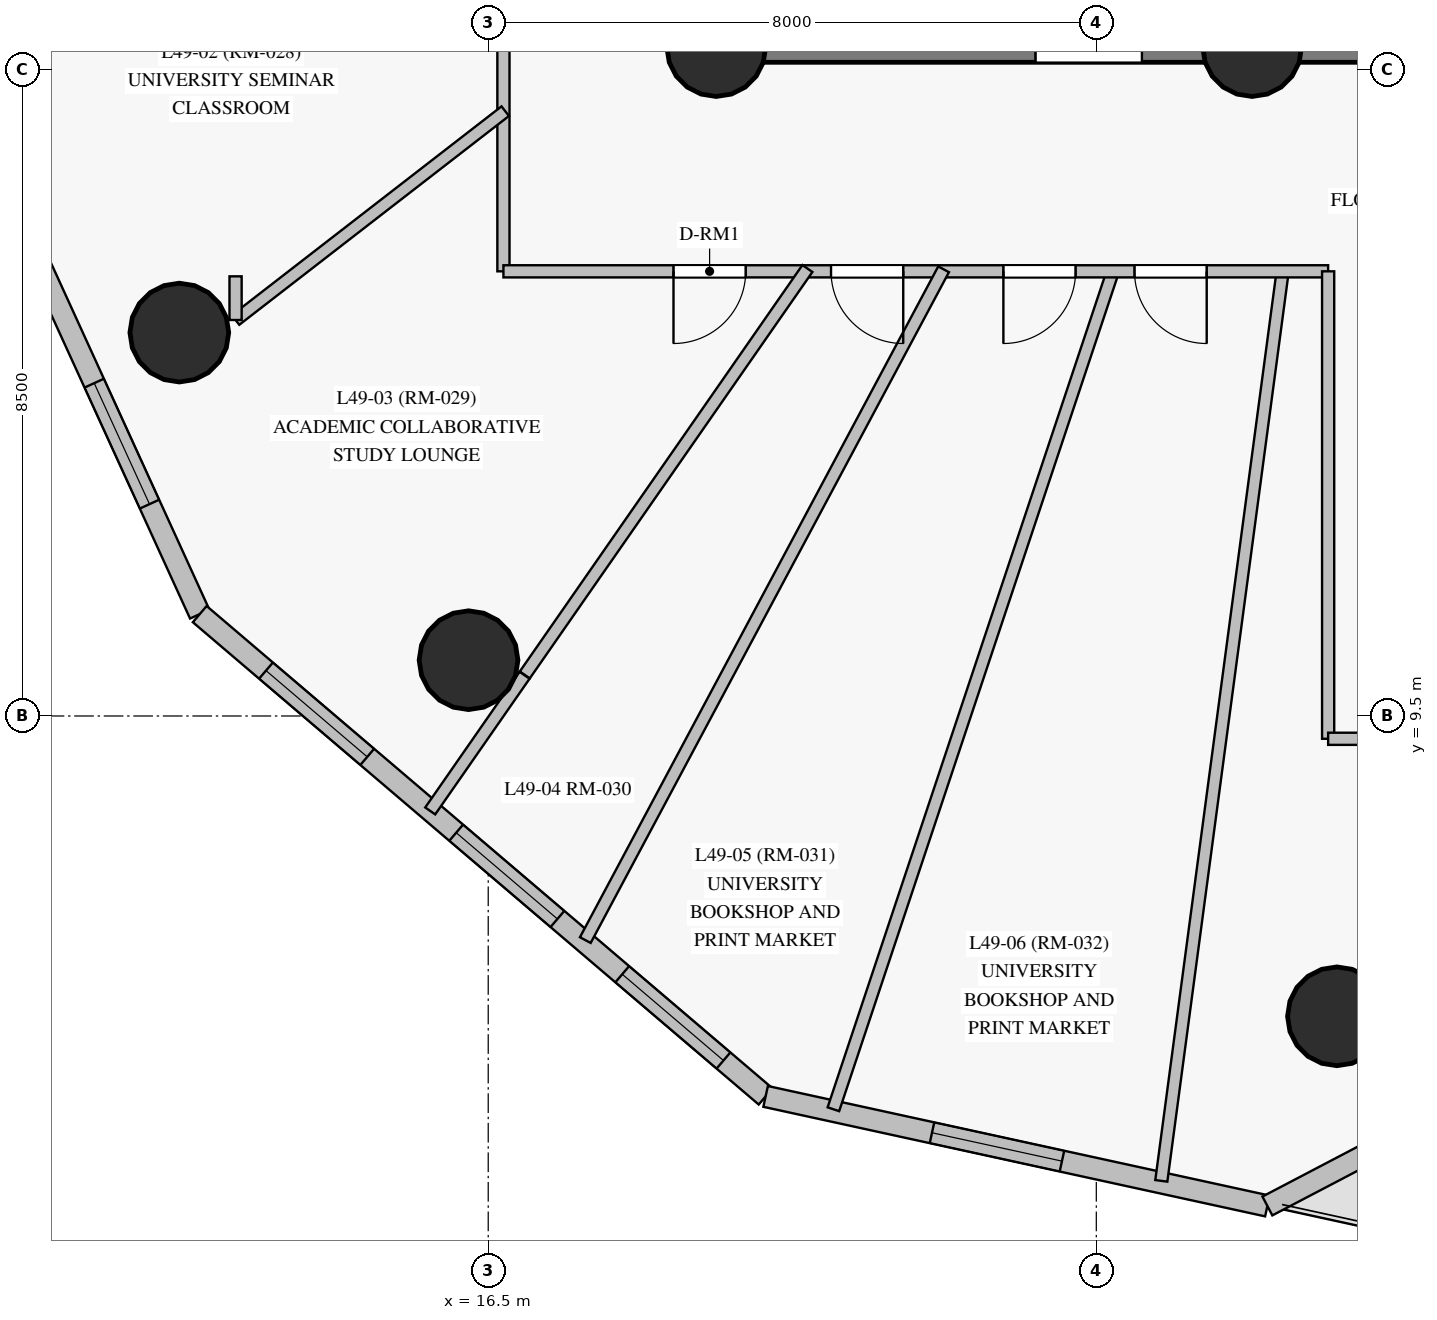
"""IFC4 building model, lengths in metres.
Left out: names, types, materials, properties, quantities, classifications, styles, units other than length and angle.
Written with IfcOpenShell. Run it as: python <this file> out.ifc"""

import sys

from ifc_helpers import new_model, si_unit, direction, frame, frame_2d, origin, origin_with_axes, origin_2d, place, context, subcontext, project, spatial, rectangle, circle, extrude, source, transform, mapped, element, fill, save


model = new_model("IFC4")
c1 = context("Model", 3, precision=1e-05, world=origin(), true_north=direction((0.0, 1.0)))
c2 = subcontext(c1, "Body", "Model", "MODEL_VIEW")
j1 = project(units=[si_unit("LENGTHUNIT", "METRE"), si_unit("PLANEANGLEUNIT", "RADIAN")], contexts=[c1])
p1 = place(None, origin())
s1 = spatial("IfcSite", under=j1, at=p1, CompositionType="ELEMENT")
p2 = place(p1, origin())
s2 = spatial("IfcBuilding", under=s1, at=p2, CompositionType="ELEMENT")
p3 = place(p2, frame((0.0, 0.0, 171.8)))
s3 = spatial("IfcBuildingStorey", under=s2, at=p3, CompositionType="ELEMENT", Elevation=171.8)
p4 = place(p3, frame((19.5, 18.3, 0.0), z_axis=(0.0, 0.0, 1.0), x_axis=(1.0, 0.0, 0.0)))
e1 = element("IfcWall", 1, at=p4, inside=s3, PredefinedType="SHEAR", context=c2, shape_type="SweptSolid", body=[
    extrude(rectangle(XDim=7.05, YDim=0.4, at=frame_2d((3.525, 0.0))), origin(), (0.0, 0.0, 1.0), 2.825),
])
p5 = place(p4, frame((4.2, 0.0, 0.0)))
e2 = element("IfcOpeningElement", 2, at=p5, cuts=e1, PredefinedType="OPENING", context=c2, shape_type="SweptSolid", body=[
    extrude(rectangle(XDim=1.4, YDim=2.2, at=frame_2d((0.7, 1.1))), frame((0.0, 0.21, 0.0), z_axis=(0.0, -1.0, 0.0), x_axis=(1.0, 0.0, 0.0)), (0.0, 0.0, 1.0), 0.42),
])
p6 = place(p3, frame((26.55, 18.3, 0.0), z_axis=(0.0, 0.0, 1.0), x_axis=(1.0, 0.0, 0.0)))
e3 = element("IfcWall", 3, at=p6, inside=s3, PredefinedType="SHEAR", context=c2, shape_type="SweptSolid", body=[
    extrude(rectangle(XDim=10.95, YDim=0.4, at=frame_2d((5.475, 0.0))), origin(), (0.0, 0.0, 1.0), 2.825),
])
p7 = place(p6, frame((4.55, 0.0, 0.0)))
e4 = element("IfcOpeningElement", 4, at=p7, cuts=e3, PredefinedType="OPENING", context=c2, shape_type="SweptSolid", body=[
    extrude(rectangle(XDim=1.4, YDim=2.2, at=frame_2d((0.7, 1.1))), frame((0.0, 0.21, 0.0), z_axis=(0.0, -1.0, 0.0), x_axis=(1.0, 0.0, 0.0)), (0.0, 0.0, 1.0), 0.42),
])
m1 = source(origin_with_axes(), c2, "Body", "SweptSolid", [
    extrude(circle(Radius=0.65, at=origin_2d()), origin(), (0.0, 0.0, 1.0), 3.05),
])
for number, where, z_axis, x_axis in (
    (5, (19.5, 18.3, 0.0), (0.0, 0.0, 1.0), (1.0, 0.0, 0.0)),
    (6, (26.55, 18.3, 0.0), (0.0, 0.0, 1.0), (1.0, 0.0, 0.0)),
    (7, (12.436, 14.544, 0.0), (0.0, 0.0, 1.0), (1.0, 0.0, 0.0)),
    (8, (16.241, 10.234, 0.0), (0.0, 0.0, 1.0), (1.0, 0.0, 0.0)),
    (9, (27.666, 5.549, 0.0), (0.0, 0.0, 1.0), (1.0, 0.0, 0.0)),
):
    element("IfcColumn", number, at=place(p3, frame(where, z_axis=z_axis, x_axis=x_axis)), inside=s3, PredefinedType="COLUMN", context=c2, shape_type="MappedRepresentation", body=[
        mapped(m1, transform((0.0, 0.0, 0.0), scale=1.0)),
    ])
p8 = place(p3, frame((6.958, 23.418, 0.0), z_axis=(0.0, 0.0, 1.0), x_axis=(0.415561981729, -0.909564862636, 0.0)))
e10 = element("IfcWall", 10, at=p8, inside=s3, PredefinedType="SOLIDWALL", context=c2, shape_type="SweptSolid", body=[
    extrude(rectangle(XDim=13.828, YDim=0.28, at=frame_2d((6.914, 0.0))), origin(), (0.0, 0.0, 1.0), 2.825),
])
p9 = place(p8, frame((1.548, 0.0, 0.85)))
e11 = element("IfcOpeningElement", 11, at=p9, cuts=e10, PredefinedType="OPENING", context=c2, shape_type="SweptSolid", body=[
    extrude(rectangle(XDim=1.75, YDim=1.65, at=frame_2d((0.875, 0.825))), frame((0.0, 0.15, 0.0), z_axis=(0.0, -1.0, 0.0), x_axis=(1.0, 0.0, 0.0)), (0.0, 0.0, 1.0), 0.3),
])
p10 = place(p8, frame((6.317, 0.0, 0.85)))
e12 = element("IfcOpeningElement", 12, at=p10, cuts=e10, PredefinedType="OPENING", context=c2, shape_type="SweptSolid", body=[
    extrude(rectangle(XDim=1.75, YDim=1.65, at=frame_2d((0.875, 0.825))), frame((0.0, 0.15, 0.0), z_axis=(0.0, -1.0, 0.0), x_axis=(1.0, 0.0, 0.0)), (0.0, 0.0, 1.0), 0.3),
])
p11 = place(p8, frame((10.488, 0.0, 0.85)))
e13 = element("IfcOpeningElement", 13, at=p11, cuts=e10, PredefinedType="OPENING", context=c2, shape_type="SweptSolid", body=[
    extrude(rectangle(XDim=1.75, YDim=1.65, at=frame_2d((0.875, 0.825))), frame((0.0, 0.15, 0.0), z_axis=(0.0, -1.0, 0.0), x_axis=(1.0, 0.0, 0.0)), (0.0, 0.0, 1.0), 0.3),
])
p12 = place(p3, frame((12.705, 10.84, 0.0), z_axis=(0.0, 0.0, 1.0), x_axis=(0.761087604187, -0.648649102946, 0.0)))
e14 = element("IfcWall", 14, at=p12, inside=s3, PredefinedType="SOLIDWALL", context=c2, shape_type="SweptSolid", body=[
    extrude(rectangle(XDim=9.782, YDim=0.28, at=frame_2d((4.891, 0.0))), origin(), (0.0, 0.0, 1.0), 2.825),
])
p13 = place(p12, frame((1.146, 0.0, 0.85)))
e15 = element("IfcOpeningElement", 15, at=p13, cuts=e14, PredefinedType="OPENING", context=c2, shape_type="SweptSolid", body=[
    extrude(rectangle(XDim=1.75, YDim=1.65, at=frame_2d((0.875, 0.825))), frame((0.0, 0.15, 0.0), z_axis=(0.0, -1.0, 0.0), x_axis=(1.0, 0.0, 0.0)), (0.0, 0.0, 1.0), 0.3),
])
p14 = place(p12, frame((4.433, 0.0, 0.85)))
e16 = element("IfcOpeningElement", 16, at=p14, cuts=e14, PredefinedType="OPENING", context=c2, shape_type="SweptSolid", body=[
    extrude(rectangle(XDim=1.75, YDim=1.65, at=frame_2d((0.875, 0.825))), frame((0.0, 0.15, 0.0), z_axis=(0.0, -1.0, 0.0), x_axis=(1.0, 0.0, 0.0)), (0.0, 0.0, 1.0), 0.3),
])
p15 = place(p12, frame((7.303, 0.0, 0.85)))
e17 = element("IfcOpeningElement", 17, at=p15, cuts=e14, PredefinedType="OPENING", context=c2, shape_type="SweptSolid", body=[
    extrude(rectangle(XDim=1.75, YDim=1.65, at=frame_2d((0.875, 0.825))), frame((0.0, 0.15, 0.0), z_axis=(0.0, -1.0, 0.0), x_axis=(1.0, 0.0, 0.0)), (0.0, 0.0, 1.0), 0.3),
])
p16 = place(p3, frame((20.149, 4.495, 0.0), z_axis=(0.0, 0.0, 1.0), x_axis=(0.97698126959, -0.21332510136, 0.0)))
e18 = element("IfcWall", 18, at=p16, inside=s3, PredefinedType="SOLIDWALL", context=c2, shape_type="SweptSolid", body=[
    extrude(rectangle(XDim=6.757, YDim=0.28, at=frame_2d((3.378, 0.0))), origin(), (0.0, 0.0, 1.0), 2.825),
])
p17 = place(p16, frame((2.24, 0.0, 0.85)))
e19 = element("IfcOpeningElement", 19, at=p17, cuts=e18, PredefinedType="OPENING", context=c2, shape_type="SweptSolid", body=[
    extrude(rectangle(XDim=1.75, YDim=1.65, at=frame_2d((0.875, 0.825))), frame((0.0, 0.15, 0.0), z_axis=(0.0, -1.0, 0.0), x_axis=(1.0, 0.0, 0.0)), (0.0, 0.0, 1.0), 0.3),
])
p18 = place(p3, frame((26.751, 3.054, 0.0), z_axis=(0.0, 0.0, 1.0), x_axis=(0.885874198796, 0.463925537029, 0.0)))
e20 = element("IfcWall", 20, at=p18, inside=s3, PredefinedType="SOLIDWALL", context=c2, shape_type="SweptSolid", body=[
    extrude(rectangle(XDim=17.919, YDim=0.28, at=frame_2d((8.96, 0.0))), origin(), (0.0, 0.0, 1.0), 2.495),
])
p19 = place(p18, frame((9.181, 0.0, 0.0)))
e21 = element("IfcOpeningElement", 21, at=p19, cuts=e20, PredefinedType="OPENING", context=c2, shape_type="SweptSolid", body=[
    extrude(rectangle(XDim=1.05, YDim=2.12, at=frame_2d((0.525, 1.06))), frame((0.0, 0.15, 0.0), z_axis=(0.0, -1.0, 0.0), x_axis=(1.0, 0.0, 0.0)), (0.0, 0.0, 1.0), 0.3),
])
p20 = place(p3, frame((16.7, 15.35, 0.0), z_axis=(0.0, 0.0, 1.0), x_axis=(0.0, 1.0, 0.0)))
e22 = element("IfcWall", 22, at=p20, inside=s3, PredefinedType="PARTITIONING", context=c2, shape_type="SweptSolid", body=[
    extrude(rectangle(XDim=22.3, YDim=0.16, at=frame_2d((11.15, 0.0))), origin(), (0.0, 0.0, 1.0), 2.275),
])
p21 = place(p20, frame((7.33, 0.0, 0.0)))
e23 = element("IfcOpeningElement", 23, at=p21, cuts=e22, PredefinedType="OPENING", context=c2, shape_type="SweptSolid", body=[
    extrude(rectangle(XDim=0.95, YDim=2.15, at=frame_2d((0.475, 1.075))), frame((0.0, 0.09, 0.0), z_axis=(0.0, -1.0, 0.0), x_axis=(1.0, 0.0, 0.0)), (0.0, 0.0, 1.0), 0.18),
])
p22 = place(p20, frame((5.1, 0.0, 0.0)))
e24 = element("IfcOpeningElement", 24, at=p22, cuts=e22, PredefinedType="OPENING", context=c2, shape_type="SweptSolid", body=[
    extrude(rectangle(XDim=0.96, YDim=2.15, at=frame_2d((0.48, 1.075))), frame((0.0, 0.09, 0.0), z_axis=(0.0, -1.0, 0.0), x_axis=(1.0, 0.0, 0.0)), (0.0, 0.0, 1.0), 0.18),
])
p23 = place(p20, frame((16.64, 0.0, 0.0)))
e25 = element("IfcOpeningElement", 25, at=p23, cuts=e22, PredefinedType="OPENING", context=c2, shape_type="SweptSolid", body=[
    extrude(rectangle(XDim=0.95, YDim=2.15, at=frame_2d((0.475, 1.075))), frame((0.0, 0.09, 0.0), z_axis=(0.0, -1.0, 0.0), x_axis=(1.0, 0.0, 0.0)), (0.0, 0.0, 1.0), 0.18),
])
p24 = place(p20, frame((11.215, 0.0, 0.0)))
e26 = element("IfcOpeningElement", 26, at=p24, cuts=e22, PredefinedType="OPENING", context=c2, shape_type="SweptSolid", body=[
    extrude(rectangle(XDim=0.95, YDim=2.15, at=frame_2d((0.475, 1.075))), frame((0.0, 0.09, 0.0), z_axis=(0.0, -1.0, 0.0), x_axis=(1.0, 0.0, 0.0)), (0.0, 0.0, 1.0), 0.18),
])
p25 = place(p3, frame((26.956, 15.38, 0.0), z_axis=(0.0, 0.0, 1.0), x_axis=(-0.132261506649, -0.991214857566, 0.0)))
e27 = element("IfcWall", 27, at=p25, inside=s3, PredefinedType="PARTITIONING", context=c2, shape_type="SweptSolid", body=[
    extrude(rectangle(XDim=12.102, YDim=0.16, at=frame_2d((6.051, 0.0))), origin(), (0.0, 0.0, 1.0), 2.275),
])
p26 = place(p3, frame((24.727, 15.378, 0.0), z_axis=(0.0, 0.0, 1.0), x_axis=(-0.316403784932, -0.948624606934, 0.0)))
e28 = element("IfcWall", 28, at=p26, inside=s3, PredefinedType="PARTITIONING", context=c2, shape_type="SweptSolid", body=[
    extrude(rectangle(XDim=11.651, YDim=0.16, at=frame_2d((5.825, 0.0))), origin(), (0.0, 0.0, 1.0), 2.825),
])
p27 = place(p3, frame((27.55, 15.35, 0.0), z_axis=(0.0, 0.0, 1.0), x_axis=(-1.0, 0.0, 0.0)))
e29 = element("IfcWall", 29, at=p27, inside=s3, PredefinedType="PARTITIONING", context=c2, shape_type="SweptSolid", body=[
    extrude(rectangle(XDim=10.85, YDim=0.16, at=frame_2d((5.425, 0.0))), origin(), (0.0, 0.0, 1.0), 2.375),
])
p28 = place(p27, frame((7.663, 0.0, 0.0)))
e30 = element("IfcOpeningElement", 30, at=p28, cuts=e29, PredefinedType="OPENING", context=c2, shape_type="SweptSolid", body=[
    extrude(rectangle(XDim=0.95, YDim=2.15, at=frame_2d((0.475, 1.075))), frame((0.0, 0.09, 0.0), z_axis=(0.0, -1.0, 0.0), x_axis=(1.0, 0.0, 0.0)), (0.0, 0.0, 1.0), 0.18),
])
p29 = place(p27, frame((5.59, 0.0, 0.0)))
e31 = element("IfcOpeningElement", 31, at=p29, cuts=e29, PredefinedType="OPENING", context=c2, shape_type="SweptSolid", body=[
    extrude(rectangle(XDim=0.95, YDim=2.15, at=frame_2d((0.475, 1.075))), frame((0.0, 0.09, 0.0), z_axis=(0.0, -1.0, 0.0), x_axis=(1.0, 0.0, 0.0)), (0.0, 0.0, 1.0), 0.18),
])
p30 = place(p27, frame((3.323, 0.0, 0.0)))
e32 = element("IfcOpeningElement", 32, at=p30, cuts=e29, PredefinedType="OPENING", context=c2, shape_type="SweptSolid", body=[
    extrude(rectangle(XDim=0.95, YDim=2.15, at=frame_2d((0.475, 1.075))), frame((0.0, 0.09, 0.0), z_axis=(0.0, -1.0, 0.0), x_axis=(1.0, 0.0, 0.0)), (0.0, 0.0, 1.0), 0.18),
])
p31 = place(p27, frame((1.597, 0.0, 0.0)))
e33 = element("IfcOpeningElement", 33, at=p31, cuts=e29, PredefinedType="OPENING", context=c2, shape_type="SweptSolid", body=[
    extrude(rectangle(XDim=0.95, YDim=2.15, at=frame_2d((0.475, 1.075))), frame((0.0, 0.09, 0.0), z_axis=(0.0, -1.0, 0.0), x_axis=(1.0, 0.0, 0.0)), (0.0, 0.0, 1.0), 0.18),
])
p32 = place(p3, frame((22.491, 15.376, 0.0), z_axis=(0.0, 0.0, 1.0), x_axis=(-0.471112508016, -0.882073128936, 0.0)))
e34 = element("IfcWall", 34, at=p32, inside=s3, PredefinedType="PARTITIONING", context=c2, shape_type="SweptSolid", body=[
    extrude(rectangle(XDim=10.005, YDim=0.16, at=frame_2d((5.002, 0.0))), origin(), (0.0, 0.0, 1.0), 2.825),
])
p33 = place(p3, frame((20.699, 15.387, 0.0), z_axis=(0.0, 0.0, 1.0), x_axis=(-0.570926088809, -0.821001462311, 0.0)))
e35 = element("IfcWall", 35, at=p33, inside=s3, PredefinedType="PARTITIONING", context=c2, shape_type="SweptSolid", body=[
    extrude(rectangle(XDim=6.513, YDim=0.16, at=frame_2d((3.256, 0.0))), origin(), (0.0, 0.0, 1.0), 2.825),
])
p34 = place(p3, frame((27.55, 9.2, 0.0), z_axis=(0.0, 0.0, 1.0), x_axis=(0.0, 1.0, 0.0)))
e36 = element("IfcWall", 36, at=p34, inside=s3, PredefinedType="PARTITIONING", context=c2, shape_type="SweptSolid", body=[
    extrude(rectangle(XDim=6.15, YDim=0.16, at=frame_2d((3.075, 0.0))), origin(), (0.0, 0.0, 1.0), 2.275),
])
p35 = place(p3, frame((16.724, 17.457, 0.0), z_axis=(0.0, 0.0, 1.0), x_axis=(-0.79066592858, -0.612247816969, 0.0)))
e37 = element("IfcWall", 37, at=p35, inside=s3, PredefinedType="PARTITIONING", context=c2, shape_type="SweptSolid", body=[
    extrude(rectangle(XDim=4.487, YDim=0.16, at=frame_2d((2.243, 0.0))), origin(), (0.0, 0.0, 1.0), 2.275),
])
p36 = place(p3, frame((29.55, 9.2, 0.0), z_axis=(0.0, 0.0, 1.0), x_axis=(-1.0, 0.0, 0.0)))
e38 = element("IfcWall", 38, at=p36, inside=s3, PredefinedType="PARTITIONING", context=c2, shape_type="SweptSolid", body=[
    extrude(rectangle(XDim=2.0, YDim=0.16, at=frame_2d((1.0, 0.0))), origin(), (0.0, 0.0, 1.0), 2.495),
])
p37 = place(p36, frame((0.525, 0.0, 0.0)))
e39 = element("IfcOpeningElement", 39, at=p37, cuts=e38, PredefinedType="OPENING", context=c2, shape_type="SweptSolid", body=[
    extrude(rectangle(XDim=0.95, YDim=2.15, at=frame_2d((0.475, 1.075))), frame((0.0, 0.09, 0.0), z_axis=(0.0, -1.0, 0.0), x_axis=(1.0, 0.0, 0.0)), (0.0, 0.0, 1.0), 0.18),
])
p38 = place(p3, frame((16.978, 10.036, 0.0), z_axis=(0.0, 0.0, 1.0), x_axis=(-0.570995395551, -0.820953261922, 0.0)))
e40 = element("IfcWall", 40, at=p38, inside=s3, PredefinedType="PARTITIONING", context=c2, shape_type="SweptSolid", body=[
    extrude(rectangle(XDim=2.174, YDim=0.16, at=frame_2d((1.087, 0.0))), origin(), (0.0, 0.0, 1.0), 2.825),
])
p39 = place(p3, frame((13.176, 14.71, 0.0), z_axis=(0.0, 0.0, 1.0), x_axis=(0.0, 1.0, 0.0)))
e41 = element("IfcWall", 41, at=p39, inside=s3, PredefinedType="PARTITIONING", context=c2, shape_type="SweptSolid", body=[
    extrude(rectangle(XDim=0.574, YDim=0.16, at=frame_2d((0.287, 0.0))), origin(), (0.0, 0.0, 1.0), 2.275),
])
m2 = source(origin_with_axes(), c2, "Body", "SweptSolid", [
    extrude(rectangle(XDim=1.75, YDim=1.65, at=frame_2d((0.875, 0.825))), frame((0.0, 0.03, 0.0), z_axis=(0.0, -1.0, 0.0), x_axis=(1.0, 0.0, 0.0)), (0.0, 0.0, 1.0), 0.06),
])
p40 = place(p11, origin())
e42 = element("IfcWindow", 42, at=p40, inside=s3, PartitioningType="SINGLE_PANEL", PredefinedType="WINDOW", context=c2, shape_type="MappedRepresentation", body=[
    mapped(m2, transform((0.0, 0.0, 0.0), scale=1.0)),
])
fill(e13, e42)
p41 = place(p13, origin())
e43 = element("IfcWindow", 43, at=p41, inside=s3, PartitioningType="SINGLE_PANEL", PredefinedType="WINDOW", context=c2, shape_type="MappedRepresentation", body=[
    mapped(m2, transform((0.0, 0.0, 0.0), scale=1.0)),
])
fill(e15, e43)
p42 = place(p14, origin())
e44 = element("IfcWindow", 44, at=p42, inside=s3, PartitioningType="SINGLE_PANEL", PredefinedType="WINDOW", context=c2, shape_type="MappedRepresentation", body=[
    mapped(m2, transform((0.0, 0.0, 0.0), scale=1.0)),
])
fill(e16, e44)
p43 = place(p15, origin())
e45 = element("IfcWindow", 45, at=p43, inside=s3, PartitioningType="SINGLE_PANEL", PredefinedType="WINDOW", context=c2, shape_type="MappedRepresentation", body=[
    mapped(m2, transform((0.0, 0.0, 0.0), scale=1.0)),
])
fill(e17, e45)
p44 = place(p17, origin())
e46 = element("IfcWindow", 46, at=p44, inside=s3, PartitioningType="SINGLE_PANEL", PredefinedType="WINDOW", context=c2, shape_type="MappedRepresentation", body=[
    mapped(m2, transform((0.0, 0.0, 0.0), scale=1.0)),
])
fill(e19, e46)
m3 = source(origin_with_axes(), c2, "Body", "SweptSolid", [
    extrude(rectangle(XDim=0.95, YDim=2.15, at=frame_2d((0.475, 1.075))), frame((0.0, 0.025, 0.0), z_axis=(0.0, -1.0, 0.0), x_axis=(1.0, 0.0, 0.0)), (0.0, 0.0, 1.0), 0.05),
])
p45 = place(p28, origin())
e47 = element("IfcDoor", 47, at=p45, inside=s3, OperationType="SINGLE_SWING_RIGHT", PredefinedType="DOOR", context=c2, shape_type="MappedRepresentation", body=[
    mapped(m3, transform((0.0, 0.0, 0.0), scale=1.0)),
])
fill(e30, e47)
p46 = place(p29, origin())
e48 = element("IfcDoor", 48, at=p46, inside=s3, OperationType="SINGLE_SWING_LEFT", PredefinedType="DOOR", context=c2, shape_type="MappedRepresentation", body=[
    mapped(m3, transform((0.0, 0.0, 0.0), scale=1.0)),
])
fill(e31, e48)
p47 = place(p30, origin())
e49 = element("IfcDoor", 49, at=p47, inside=s3, OperationType="SINGLE_SWING_RIGHT", PredefinedType="DOOR", context=c2, shape_type="MappedRepresentation", body=[
    mapped(m3, transform((0.0, 0.0, 0.0), scale=1.0)),
])
fill(e32, e49)
p48 = place(p31, origin())
e50 = element("IfcDoor", 50, at=p48, inside=s3, OperationType="SINGLE_SWING_LEFT", PredefinedType="DOOR", context=c2, shape_type="MappedRepresentation", body=[
    mapped(m3, transform((0.0, 0.0, 0.0), scale=1.0)),
])
fill(e33, e50)
save(model, sys.argv[1])
